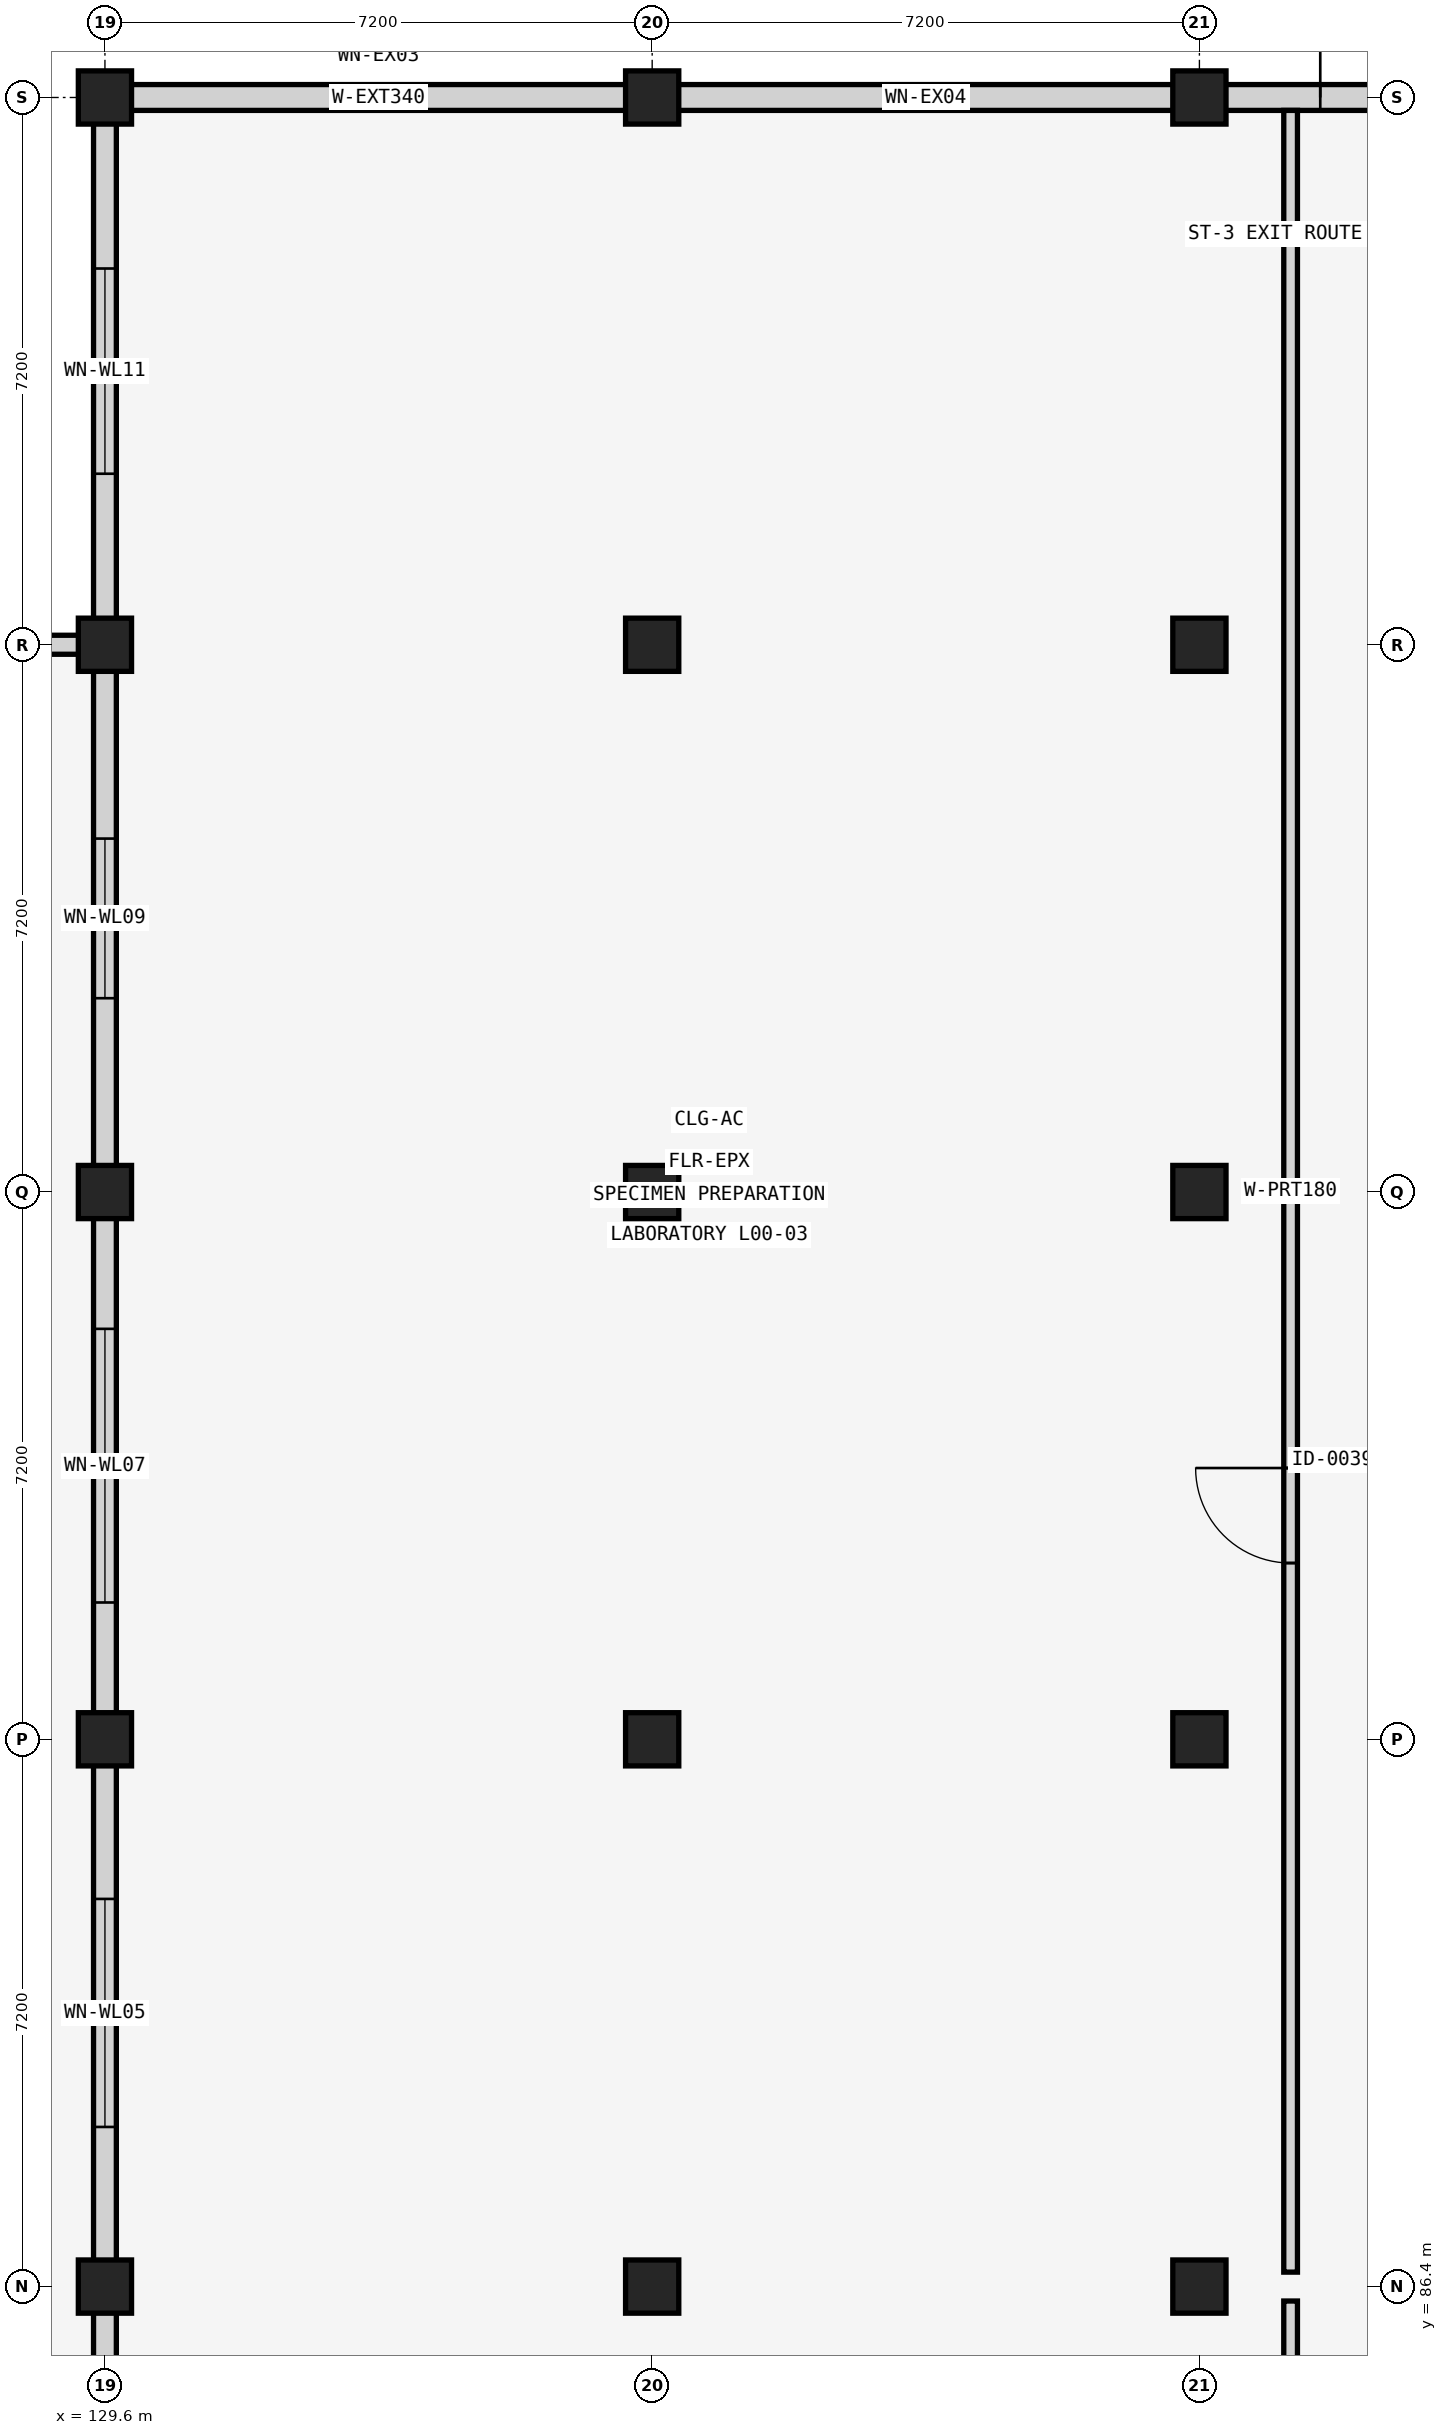
"""IFC4 building model, lengths in metres.
Left out: names, types, materials, properties, quantities, classifications, styles, units other than length and angle.
Written with IfcOpenShell. Run it as: python <this file> out.ifc"""

import sys

from ifc_helpers import new_model, si_unit, direction, frame, frame_2d, origin, origin_2d, place, context, subcontext, project, spatial, rectangle, extrude, element, fill, save


model = new_model("IFC4")
c1 = context("Model", 3, precision=1e-05, world=origin(), true_north=direction((0.0, 1.0)))
c2 = subcontext(c1, "Body", "Model", "MODEL_VIEW")
j1 = project(units=[si_unit("LENGTHUNIT", "METRE"), si_unit("PLANEANGLEUNIT", "RADIAN")], contexts=[c1])
p1 = place(None, origin())
s1 = spatial("IfcSite", under=j1, at=p1, CompositionType="ELEMENT")
p2 = place(p1, origin())
s2 = spatial("IfcBuilding", under=s1, at=p2, CompositionType="ELEMENT")
p3 = place(p2, origin())
s3 = spatial("IfcBuildingStorey", under=s2, at=p3, CompositionType="ELEMENT", Elevation=0.0)
for number, where, z_axis, x_axis in (
    (1, (129.6, 86.4, 0.0), (0.0, 0.0, 1.0), (1.0, 0.0, 0.0)),
    (2, (129.6, 93.6, 0.0), (0.0, 0.0, 1.0), (1.0, 0.0, 0.0)),
    (3, (129.6, 100.8, 0.0), (0.0, 0.0, 1.0), (1.0, 0.0, 0.0)),
    (4, (129.6, 108.0, 0.0), (0.0, 0.0, 1.0), (1.0, 0.0, 0.0)),
    (5, (129.6, 115.2, 0.0), (0.0, 0.0, 1.0), (1.0, 0.0, 0.0)),
    (6, (136.8, 86.4, 0.0), (0.0, 0.0, 1.0), (1.0, 0.0, 0.0)),
    (7, (136.8, 93.6, 0.0), (0.0, 0.0, 1.0), (1.0, 0.0, 0.0)),
    (8, (136.8, 100.8, 0.0), (0.0, 0.0, 1.0), (1.0, 0.0, 0.0)),
    (9, (136.8, 108.0, 0.0), (0.0, 0.0, 1.0), (1.0, 0.0, 0.0)),
    (10, (136.8, 115.2, 0.0), (0.0, 0.0, 1.0), (1.0, 0.0, 0.0)),
    (11, (144.0, 86.4, 0.0), (0.0, 0.0, 1.0), (1.0, 0.0, 0.0)),
    (12, (144.0, 93.6, 0.0), (0.0, 0.0, 1.0), (1.0, 0.0, 0.0)),
    (13, (144.0, 100.8, 0.0), (0.0, 0.0, 1.0), (1.0, 0.0, 0.0)),
    (14, (144.0, 108.0, 0.0), (0.0, 0.0, 1.0), (1.0, 0.0, 0.0)),
    (15, (144.0, 115.2, 0.0), (0.0, 0.0, 1.0), (1.0, 0.0, 0.0)),
):
    element("IfcColumn", number, at=place(p3, frame(where, z_axis=z_axis, x_axis=x_axis)), inside=s3, PredefinedType="COLUMN", context=c2, shape_type="SweptSolid", body=[
        extrude(rectangle(XDim=0.7, YDim=0.7, at=origin_2d()), origin(), (0.0, 0.0, 1.0), 4.8),
    ])
p4 = place(p3, frame((129.94, 115.2, 0.0), z_axis=(0.0, 0.0, 1.0), x_axis=(1.0, 0.0, 0.0)))
e16 = element("IfcWall", 16, at=p4, inside=s3, PredefinedType="SOLIDWALL", context=c2, shape_type="SweptSolid", body=[
    extrude(rectangle(XDim=6.52, YDim=0.34, at=frame_2d((3.26, 0.0))), origin(), (0.0, 0.0, 1.0), 3.75),
])
p5 = place(p4, frame((2.835, 0.0, 0.95)))
e17 = element("IfcOpeningElement", 17, at=p5, cuts=e16, PredefinedType="OPENING", context=c2, shape_type="SweptSolid", body=[
    extrude(rectangle(XDim=0.85, YDim=2.3, at=frame_2d((0.425, 1.15))), frame((0.0, 0.18, 0.0), z_axis=(0.0, -1.0, 0.0), x_axis=(1.0, 0.0, 0.0)), (0.0, 0.0, 1.0), 0.36),
])
p6 = place(p3, frame((137.14, 115.2, 0.0), z_axis=(0.0, 0.0, 1.0), x_axis=(1.0, 0.0, 0.0)))
e18 = element("IfcWall", 18, at=p6, inside=s3, PredefinedType="SOLIDWALL", context=c2, shape_type="SweptSolid", body=[
    extrude(rectangle(XDim=6.52, YDim=0.34, at=frame_2d((3.26, 0.0))), origin(), (0.0, 0.0, 1.0), 3.75),
])
p7 = place(p6, frame((2.785, 0.0, 0.95)))
e19 = element("IfcOpeningElement", 19, at=p7, cuts=e18, PredefinedType="OPENING", context=c2, shape_type="SweptSolid", body=[
    extrude(rectangle(XDim=0.95, YDim=2.3, at=frame_2d((0.475, 1.15))), frame((0.0, 0.18, 0.0), z_axis=(0.0, -1.0, 0.0), x_axis=(1.0, 0.0, 0.0)), (0.0, 0.0, 1.0), 0.36),
])
p8 = place(p3, frame((144.34, 115.2, 0.0), z_axis=(0.0, 0.0, 1.0), x_axis=(1.0, 0.0, 0.0)))
e20 = element("IfcWall", 20, at=p8, inside=s3, PredefinedType="SOLIDWALL", context=c2, shape_type="SweptSolid", body=[
    extrude(rectangle(XDim=6.52, YDim=0.34, at=frame_2d((3.26, 0.0))), origin(), (0.0, 0.0, 1.0), 3.75),
])
p9 = place(p8, frame((1.25, 0.0, 0.0)))
e21 = element("IfcOpeningElement", 21, at=p9, cuts=e20, PredefinedType="OPENING", context=c2, shape_type="SweptSolid", body=[
    extrude(rectangle(XDim=1.8, YDim=2.4, at=frame_2d((0.9, 1.2))), frame((0.0, 0.18, 0.0), z_axis=(0.0, -1.0, 0.0), x_axis=(1.0, 0.0, 0.0)), (0.0, 0.0, 1.0), 0.36),
])
p10 = place(p3, frame((129.6, 79.54, 0.0), z_axis=(0.0, 0.0, 1.0), x_axis=(0.0, 1.0, 0.0)))
e22 = element("IfcWall", 22, at=p10, inside=s3, PredefinedType="SOLIDWALL", context=c2, shape_type="SweptSolid", body=[
    extrude(rectangle(XDim=6.52, YDim=0.3, at=frame_2d((3.26, 0.0))), origin(), (0.0, 0.0, 1.0), 3.75),
])
p11 = place(p10, frame((2.51, 0.0, 0.0)))
e23 = element("IfcOpeningElement", 23, at=p11, cuts=e22, PredefinedType="OPENING", context=c2, shape_type="SweptSolid", body=[
    extrude(rectangle(XDim=1.5, YDim=2.25, at=frame_2d((0.75, 1.125))), frame((0.0, 0.16, 0.0), z_axis=(0.0, -1.0, 0.0), x_axis=(1.0, 0.0, 0.0)), (0.0, 0.0, 1.0), 0.32),
])
p12 = place(p3, frame((129.6, 86.74, 0.0), z_axis=(0.0, 0.0, 1.0), x_axis=(0.0, 1.0, 0.0)))
e24 = element("IfcWall", 24, at=p12, inside=s3, PredefinedType="SOLIDWALL", context=c2, shape_type="SweptSolid", body=[
    extrude(rectangle(XDim=6.52, YDim=0.3, at=frame_2d((3.26, 0.0))), origin(), (0.0, 0.0, 1.0), 3.75),
])
p13 = place(p12, frame((1.76, 0.0, 0.95)))
e25 = element("IfcOpeningElement", 25, at=p13, cuts=e24, PredefinedType="OPENING", context=c2, shape_type="SweptSolid", body=[
    extrude(rectangle(XDim=3.0, YDim=2.1, at=frame_2d((1.5, 1.05))), frame((0.0, 0.16, 0.0), z_axis=(0.0, -1.0, 0.0), x_axis=(1.0, 0.0, 0.0)), (0.0, 0.0, 1.0), 0.32),
])
p14 = place(p3, frame((129.6, 93.94, 0.0), z_axis=(0.0, 0.0, 1.0), x_axis=(0.0, 1.0, 0.0)))
e26 = element("IfcWall", 26, at=p14, inside=s3, PredefinedType="SOLIDWALL", context=c2, shape_type="SweptSolid", body=[
    extrude(rectangle(XDim=6.52, YDim=0.3, at=frame_2d((3.26, 0.0))), origin(), (0.0, 0.0, 1.0), 3.75),
])
p15 = place(p14, frame((1.46, 0.0, 0.95)))
e27 = element("IfcOpeningElement", 27, at=p15, cuts=e26, PredefinedType="OPENING", context=c2, shape_type="SweptSolid", body=[
    extrude(rectangle(XDim=3.6, YDim=2.1, at=frame_2d((1.8, 1.05))), frame((0.0, 0.16, 0.0), z_axis=(0.0, -1.0, 0.0), x_axis=(1.0, 0.0, 0.0)), (0.0, 0.0, 1.0), 0.32),
])
p16 = place(p3, frame((129.6, 101.14, 0.0), z_axis=(0.0, 0.0, 1.0), x_axis=(0.0, 1.0, 0.0)))
e28 = element("IfcWall", 28, at=p16, inside=s3, PredefinedType="SOLIDWALL", context=c2, shape_type="SweptSolid", body=[
    extrude(rectangle(XDim=6.52, YDim=0.3, at=frame_2d((3.26, 0.0))), origin(), (0.0, 0.0, 1.0), 3.75),
])
p17 = place(p16, frame((2.21, 0.0, 0.95)))
e29 = element("IfcOpeningElement", 29, at=p17, cuts=e28, PredefinedType="OPENING", context=c2, shape_type="SweptSolid", body=[
    extrude(rectangle(XDim=2.1, YDim=1.8, at=frame_2d((1.05, 0.9))), frame((0.0, 0.16, 0.0), z_axis=(0.0, -1.0, 0.0), x_axis=(1.0, 0.0, 0.0)), (0.0, 0.0, 1.0), 0.32),
])
p18 = place(p3, frame((129.6, 108.34, 0.0), z_axis=(0.0, 0.0, 1.0), x_axis=(0.0, 1.0, 0.0)))
e30 = element("IfcWall", 30, at=p18, inside=s3, PredefinedType="SOLIDWALL", context=c2, shape_type="SweptSolid", body=[
    extrude(rectangle(XDim=6.52, YDim=0.3, at=frame_2d((3.26, 0.0))), origin(), (0.0, 0.0, 1.0), 3.75),
])
p19 = place(p18, frame((1.91, 0.0, 0.95)))
e31 = element("IfcOpeningElement", 31, at=p19, cuts=e30, PredefinedType="OPENING", context=c2, shape_type="SweptSolid", body=[
    extrude(rectangle(XDim=2.7, YDim=1.8, at=frame_2d((1.35, 0.9))), frame((0.0, 0.16, 0.0), z_axis=(0.0, -1.0, 0.0), x_axis=(1.0, 0.0, 0.0)), (0.0, 0.0, 1.0), 0.32),
])
p20 = place(p3, frame((50.4, 108.0, 0.0), z_axis=(0.0, 0.0, 1.0), x_axis=(1.0, 0.0, 0.0)))
e32 = element("IfcWall", 32, at=p20, inside=s3, PredefinedType="PARAPET", context=c2, shape_type="SweptSolid", body=[
    extrude(rectangle(XDim=79.2, YDim=0.25, at=frame_2d((39.6, 0.0))), origin(), (0.0, 0.0, 1.0), 1.1),
])
p21 = place(p3, frame((145.2, 64.89, 0.0), z_axis=(0.0, 0.0, 1.0), x_axis=(0.0, 1.0, 0.0)))
e33 = element("IfcWall", 33, at=p21, inside=s3, PredefinedType="PARTITIONING", context=c2, shape_type="SweptSolid", body=[
    extrude(rectangle(XDim=21.32, YDim=0.18, at=frame_2d((10.66, 0.0))), origin(), (0.0, 0.0, 1.0), 3.75),
])
p22 = place(p21, frame((10.11, 0.0, 0.0)))
e34 = element("IfcOpeningElement", 34, at=p22, cuts=e33, PredefinedType="OPENING", context=c2, shape_type="SweptSolid", body=[
    extrude(rectangle(XDim=1.1, YDim=2.15, at=frame_2d((0.55, 1.075))), frame((0.0, 0.1, 0.0), z_axis=(0.0, -1.0, 0.0), x_axis=(1.0, 0.0, 0.0)), (0.0, 0.0, 1.0), 0.2),
])
p23 = place(p3, frame((145.2, 86.59, 0.0), z_axis=(0.0, 0.0, 1.0), x_axis=(0.0, 1.0, 0.0)))
e35 = element("IfcWall", 35, at=p23, inside=s3, PredefinedType="PARTITIONING", context=c2, shape_type="SweptSolid", body=[
    extrude(rectangle(XDim=28.44, YDim=0.18, at=frame_2d((14.22, 0.0))), origin(), (0.0, 0.0, 1.0), 3.75),
])
p24 = place(p23, frame((9.329, 0.0, 0.0)))
e36 = element("IfcOpeningElement", 36, at=p24, cuts=e35, PredefinedType="OPENING", context=c2, shape_type="SweptSolid", body=[
    extrude(rectangle(XDim=1.25, YDim=2.2, at=frame_2d((0.625, 1.1))), frame((0.0, 0.1, 0.0), z_axis=(0.0, -1.0, 0.0), x_axis=(1.0, 0.0, 0.0)), (0.0, 0.0, 1.0), 0.2),
])
p25 = place(p5, origin())
e37 = element("IfcWindow", 37, at=p25, inside=s3, PartitioningType="SINGLE_PANEL", PredefinedType="WINDOW", context=c2, shape_type="SweptSolid", body=[
    extrude(rectangle(XDim=0.85, YDim=2.3, at=frame_2d((0.425, 1.15))), frame((0.0, 0.03, 0.0), z_axis=(0.0, -1.0, 0.0), x_axis=(1.0, 0.0, 0.0)), (0.0, 0.0, 1.0), 0.06),
])
fill(e17, e37)
p26 = place(p7, origin())
e38 = element("IfcWindow", 38, at=p26, inside=s3, PartitioningType="SINGLE_PANEL", PredefinedType="WINDOW", context=c2, shape_type="SweptSolid", body=[
    extrude(rectangle(XDim=0.95, YDim=2.3, at=frame_2d((0.475, 1.15))), frame((0.0, 0.03, 0.0), z_axis=(0.0, -1.0, 0.0), x_axis=(1.0, 0.0, 0.0)), (0.0, 0.0, 1.0), 0.06),
])
fill(e19, e38)
p27 = place(p9, origin())
e39 = element("IfcDoor", 39, at=p27, inside=s3, OperationType="DOUBLE_DOOR_SINGLE_SWING", PredefinedType="DOOR", context=c2, shape_type="SweptSolid", body=[
    extrude(rectangle(XDim=1.8, YDim=2.4, at=frame_2d((0.9, 1.2))), frame((0.0, 0.025, 0.0), z_axis=(0.0, -1.0, 0.0), x_axis=(1.0, 0.0, 0.0)), (0.0, 0.0, 1.0), 0.05),
])
fill(e21, e39)
p28 = place(p13, origin())
e40 = element("IfcWindow", 40, at=p28, inside=s3, PartitioningType="SINGLE_PANEL", PredefinedType="WINDOW", context=c2, shape_type="SweptSolid", body=[
    extrude(rectangle(XDim=3.0, YDim=2.1, at=frame_2d((1.5, 1.05))), frame((0.0, 0.03, 0.0), z_axis=(0.0, -1.0, 0.0), x_axis=(1.0, 0.0, 0.0)), (0.0, 0.0, 1.0), 0.06),
])
fill(e25, e40)
p29 = place(p15, origin())
e41 = element("IfcWindow", 41, at=p29, inside=s3, PartitioningType="SINGLE_PANEL", PredefinedType="WINDOW", context=c2, shape_type="SweptSolid", body=[
    extrude(rectangle(XDim=3.6, YDim=2.1, at=frame_2d((1.8, 1.05))), frame((0.0, 0.03, 0.0), z_axis=(0.0, -1.0, 0.0), x_axis=(1.0, 0.0, 0.0)), (0.0, 0.0, 1.0), 0.06),
])
fill(e27, e41)
p30 = place(p17, origin())
e42 = element("IfcWindow", 42, at=p30, inside=s3, PartitioningType="SINGLE_PANEL", PredefinedType="WINDOW", context=c2, shape_type="SweptSolid", body=[
    extrude(rectangle(XDim=2.1, YDim=1.8, at=frame_2d((1.05, 0.9))), frame((0.0, 0.03, 0.0), z_axis=(0.0, -1.0, 0.0), x_axis=(1.0, 0.0, 0.0)), (0.0, 0.0, 1.0), 0.06),
])
fill(e29, e42)
p31 = place(p19, origin())
e43 = element("IfcWindow", 43, at=p31, inside=s3, PartitioningType="SINGLE_PANEL", PredefinedType="WINDOW", context=c2, shape_type="SweptSolid", body=[
    extrude(rectangle(XDim=2.7, YDim=1.8, at=frame_2d((1.35, 0.9))), frame((0.0, 0.03, 0.0), z_axis=(0.0, -1.0, 0.0), x_axis=(1.0, 0.0, 0.0)), (0.0, 0.0, 1.0), 0.06),
])
fill(e31, e43)
p32 = place(p24, origin())
e44 = element("IfcDoor", 44, at=p32, inside=s3, OperationType="SINGLE_SWING_RIGHT", PredefinedType="DOOR", context=c2, shape_type="SweptSolid", body=[
    extrude(rectangle(XDim=1.25, YDim=2.2, at=frame_2d((0.625, 1.1))), frame((0.0, 0.025, 0.0), z_axis=(0.0, -1.0, 0.0), x_axis=(1.0, 0.0, 0.0)), (0.0, 0.0, 1.0), 0.05),
])
fill(e36, e44)
save(model, sys.argv[1])
